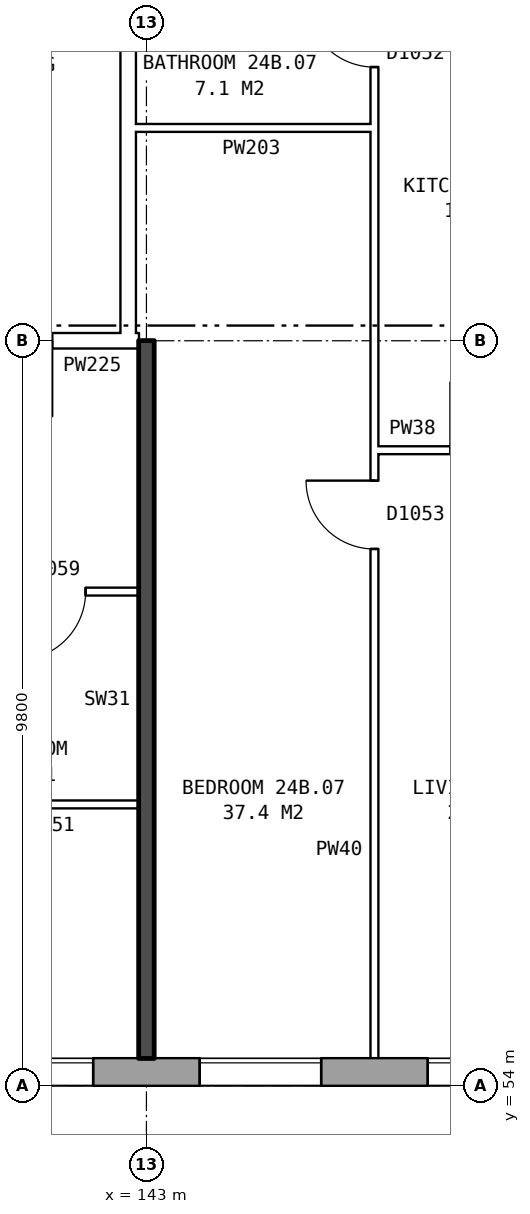
"""IFC4 building model, lengths in metres.
Left out: names, types, materials, properties, quantities, classifications, styles, units other than length and angle.
Written with IfcOpenShell. Run it as: python <this file> out.ifc"""

import sys

from ifc_helpers import new_model, si_unit, direction, frame, frame_2d, origin, place, context, subcontext, project, spatial, rectangle, extrude, element, fill, save


model = new_model("IFC4")
c1 = context("Model", 3, precision=1e-05, world=origin(), true_north=direction((0.0, 1.0)))
c2 = subcontext(c1, "Body", "Model", "MODEL_VIEW")
j1 = project(units=[si_unit("LENGTHUNIT", "METRE"), si_unit("PLANEANGLEUNIT", "RADIAN")], contexts=[c1])
p1 = place(None, origin())
s1 = spatial("IfcSite", under=j1, at=p1, CompositionType="ELEMENT")
p2 = place(p1, origin())
s2 = spatial("IfcBuilding", under=s1, at=p2, CompositionType="ELEMENT")
p3 = place(p2, frame((0.0, 0.0, 87.1)))
s3 = spatial("IfcBuildingStorey", under=s2, at=p3, CompositionType="ELEMENT", Elevation=87.1)
p4 = place(p3, frame((134.075, 54.18, 0.0), z_axis=(0.0, 0.0, 1.0), x_axis=(1.0, 0.0, 0.0)))
e1 = element("IfcWall", 1, at=p4, inside=s3, PredefinedType="STANDARD", context=c2, shape_type="SweptSolid", body=[
    extrude(rectangle(XDim=38.101, YDim=0.36, at=frame_2d((19.05, 0.0))), origin(), (0.0, 0.0, 1.0), 2.85),
])
p5 = place(p4, frame((0.625, 0.0, 0.8)))
e2 = element("IfcOpeningElement", 2, at=p5, cuts=e1, PredefinedType="OPENING", context=c2, shape_type="SweptSolid", body=[
    extrude(rectangle(XDim=1.6, YDim=1.8, at=frame_2d((0.8, 0.9))), frame((0.0, 0.19, 0.0), z_axis=(0.0, -1.0, 0.0), x_axis=(1.0, 0.0, 0.0)), (0.0, 0.0, 1.0), 0.38),
])
p6 = place(p4, frame((3.625, 0.0, 0.8)))
e3 = element("IfcOpeningElement", 3, at=p6, cuts=e1, PredefinedType="OPENING", context=c2, shape_type="SweptSolid", body=[
    extrude(rectangle(XDim=1.6, YDim=1.8, at=frame_2d((0.8, 0.9))), frame((0.0, 0.19, 0.0), z_axis=(0.0, -1.0, 0.0), x_axis=(1.0, 0.0, 0.0)), (0.0, 0.0, 1.0), 0.38),
])
p7 = place(p4, frame((6.625, 0.0, 0.8)))
e4 = element("IfcOpeningElement", 4, at=p7, cuts=e1, PredefinedType="OPENING", context=c2, shape_type="SweptSolid", body=[
    extrude(rectangle(XDim=1.6, YDim=1.8, at=frame_2d((0.8, 0.9))), frame((0.0, 0.19, 0.0), z_axis=(0.0, -1.0, 0.0), x_axis=(1.0, 0.0, 0.0)), (0.0, 0.0, 1.0), 0.38),
])
p8 = place(p4, frame((9.625, 0.0, 0.8)))
e5 = element("IfcOpeningElement", 5, at=p8, cuts=e1, PredefinedType="OPENING", context=c2, shape_type="SweptSolid", body=[
    extrude(rectangle(XDim=1.6, YDim=1.8, at=frame_2d((0.8, 0.9))), frame((0.0, 0.19, 0.0), z_axis=(0.0, -1.0, 0.0), x_axis=(1.0, 0.0, 0.0)), (0.0, 0.0, 1.0), 0.38),
])
p9 = place(p4, frame((12.625, 0.0, 0.8)))
e6 = element("IfcOpeningElement", 6, at=p9, cuts=e1, PredefinedType="OPENING", context=c2, shape_type="SweptSolid", body=[
    extrude(rectangle(XDim=1.6, YDim=1.8, at=frame_2d((0.8, 0.9))), frame((0.0, 0.19, 0.0), z_axis=(0.0, -1.0, 0.0), x_axis=(1.0, 0.0, 0.0)), (0.0, 0.0, 1.0), 0.38),
])
p10 = place(p4, frame((15.125, 0.0, 0.8)))
e7 = element("IfcOpeningElement", 7, at=p10, cuts=e1, PredefinedType="OPENING", context=c2, shape_type="SweptSolid", body=[
    extrude(rectangle(XDim=1.4, YDim=1.8, at=frame_2d((0.7, 0.9))), frame((0.0, 0.19, 0.0), z_axis=(0.0, -1.0, 0.0), x_axis=(1.0, 0.0, 0.0)), (0.0, 0.0, 1.0), 0.38),
])
p11 = place(p4, frame((18.325, 0.0, 0.15)))
e8 = element("IfcOpeningElement", 8, at=p11, cuts=e1, PredefinedType="OPENING", context=c2, shape_type="SweptSolid", body=[
    extrude(rectangle(XDim=1.4, YDim=1.2, at=frame_2d((0.7, 0.6))), frame((0.0, 0.19, 0.0), z_axis=(0.0, -1.0, 0.0), x_axis=(1.0, 0.0, 0.0)), (0.0, 0.0, 1.0), 0.38),
])
p12 = place(p4, frame((21.625, 0.0, 0.8)))
e9 = element("IfcOpeningElement", 9, at=p12, cuts=e1, PredefinedType="OPENING", context=c2, shape_type="SweptSolid", body=[
    extrude(rectangle(XDim=1.6, YDim=1.8, at=frame_2d((0.8, 0.9))), frame((0.0, 0.19, 0.0), z_axis=(0.0, -1.0, 0.0), x_axis=(1.0, 0.0, 0.0)), (0.0, 0.0, 1.0), 0.38),
])
p13 = place(p4, frame((24.625, 0.0, 0.8)))
e10 = element("IfcOpeningElement", 10, at=p13, cuts=e1, PredefinedType="OPENING", context=c2, shape_type="SweptSolid", body=[
    extrude(rectangle(XDim=1.6, YDim=1.8, at=frame_2d((0.8, 0.9))), frame((0.0, 0.19, 0.0), z_axis=(0.0, -1.0, 0.0), x_axis=(1.0, 0.0, 0.0)), (0.0, 0.0, 1.0), 0.38),
])
p14 = place(p4, frame((27.625, 0.0, 0.8)))
e11 = element("IfcOpeningElement", 11, at=p14, cuts=e1, PredefinedType="OPENING", context=c2, shape_type="SweptSolid", body=[
    extrude(rectangle(XDim=1.6, YDim=1.8, at=frame_2d((0.8, 0.9))), frame((0.0, 0.19, 0.0), z_axis=(0.0, -1.0, 0.0), x_axis=(1.0, 0.0, 0.0)), (0.0, 0.0, 1.0), 0.38),
])
p15 = place(p4, frame((30.625, 0.0, 0.8)))
e12 = element("IfcOpeningElement", 12, at=p15, cuts=e1, PredefinedType="OPENING", context=c2, shape_type="SweptSolid", body=[
    extrude(rectangle(XDim=1.6, YDim=1.8, at=frame_2d((0.8, 0.9))), frame((0.0, 0.19, 0.0), z_axis=(0.0, -1.0, 0.0), x_axis=(1.0, 0.0, 0.0)), (0.0, 0.0, 1.0), 0.38),
])
p16 = place(p4, frame((33.625, 0.0, 0.8)))
e13 = element("IfcOpeningElement", 13, at=p16, cuts=e1, PredefinedType="OPENING", context=c2, shape_type="SweptSolid", body=[
    extrude(rectangle(XDim=1.6, YDim=1.8, at=frame_2d((0.8, 0.9))), frame((0.0, 0.19, 0.0), z_axis=(0.0, -1.0, 0.0), x_axis=(1.0, 0.0, 0.0)), (0.0, 0.0, 1.0), 0.38),
])
p17 = place(p4, frame((16.825, 0.0, 1.7)))
e14 = element("IfcOpeningElement", 14, at=p17, cuts=e1, PredefinedType="OPENING", context=c2, shape_type="SweptSolid", body=[
    extrude(rectangle(XDim=0.6, YDim=0.9, at=frame_2d((0.3, 0.45))), frame((0.0, 0.19, 0.0), z_axis=(0.0, -1.0, 0.0), x_axis=(1.0, 0.0, 0.0)), (0.0, 0.0, 1.0), 0.38),
])
p18 = place(p3, frame((142.76, 63.9, 0.0), z_axis=(0.0, 0.0, 1.0), x_axis=(0.0, 1.0, 0.0)))
e15 = element("IfcWall", 15, at=p18, inside=s3, PredefinedType="PARTITIONING", context=c2, shape_type="SweptSolid", body=[
    extrude(rectangle(XDim=12.2, YDim=0.2, at=frame_2d((6.1, 0.0))), origin(), (0.0, 0.0, 1.0), 2.85),
])
p19 = place(p18, frame((5.1, 0.0, 0.0)))
e16 = element("IfcOpeningElement", 16, at=p19, cuts=e15, PredefinedType="OPENING", context=c2, shape_type="SweptSolid", body=[
    extrude(rectangle(XDim=2.0, YDim=2.1, at=frame_2d((1.0, 1.05))), frame((0.0, 0.11, 0.0), z_axis=(0.0, -1.0, 0.0), x_axis=(1.0, 0.0, 0.0)), (0.0, 0.0, 1.0), 0.22),
])
p20 = place(p3, frame((140.6, 57.7, 0.0), z_axis=(0.0, 0.0, 1.0), x_axis=(1.0, 0.0, 0.0)))
e17 = element("IfcWall", 17, at=p20, inside=s3, PredefinedType="PARTITIONING", context=c2, shape_type="SweptSolid", body=[
    extrude(rectangle(XDim=2.3, YDim=0.1, at=frame_2d((1.15, 0.0))), origin(), (0.0, 0.0, 1.0), 2.85),
])
p21 = place(p3, frame((137.1, 60.5, 0.0), z_axis=(0.0, 0.0, 1.0), x_axis=(1.0, 0.0, 0.0)))
e18 = element("IfcWall", 18, at=p21, inside=s3, PredefinedType="PARTITIONING", context=c2, shape_type="SweptSolid", body=[
    extrude(rectangle(XDim=5.8, YDim=0.1, at=frame_2d((2.9, 0.0))), origin(), (0.0, 0.0, 1.0), 2.85),
])
p22 = place(p21, frame((1.3, 0.0, 0.0)))
e19 = element("IfcOpeningElement", 19, at=p22, cuts=e18, PredefinedType="OPENING", context=c2, shape_type="SweptSolid", body=[
    extrude(rectangle(XDim=0.9, YDim=2.1, at=frame_2d((0.45, 1.05))), frame((0.0, 0.06, 0.0), z_axis=(0.0, -1.0, 0.0), x_axis=(1.0, 0.0, 0.0)), (0.0, 0.0, 1.0), 0.12),
])
p23 = place(p21, frame((4.2, 0.0, 0.0)))
e20 = element("IfcOpeningElement", 20, at=p23, cuts=e18, PredefinedType="OPENING", context=c2, shape_type="SweptSolid", body=[
    extrude(rectangle(XDim=0.9, YDim=2.1, at=frame_2d((0.45, 1.05))), frame((0.0, 0.06, 0.0), z_axis=(0.0, -1.0, 0.0), x_axis=(1.0, 0.0, 0.0)), (0.0, 0.0, 1.0), 0.12),
])
p24 = place(p3, frame((146.0, 62.36, 0.0), z_axis=(0.0, 0.0, 1.0), x_axis=(1.0, 0.0, 0.0)))
e21 = element("IfcWall", 21, at=p24, inside=s3, PredefinedType="PARTITIONING", context=c2, shape_type="SweptSolid", body=[
    extrude(rectangle(XDim=2.9, YDim=0.1, at=frame_2d((1.45, 0.0))), origin(), (0.0, 0.0, 1.0), 2.85),
])
p25 = place(p24, frame((1.0, 0.0, 0.0)))
e22 = element("IfcOpeningElement", 22, at=p25, cuts=e21, PredefinedType="OPENING", context=c2, shape_type="SweptSolid", body=[
    extrude(rectangle(XDim=0.9, YDim=2.1, at=frame_2d((0.45, 1.05))), frame((0.0, 0.06, 0.0), z_axis=(0.0, -1.0, 0.0), x_axis=(1.0, 0.0, 0.0)), (0.0, 0.0, 1.0), 0.12),
])
p26 = place(p3, frame((139.76, 63.8, 0.0), z_axis=(0.0, 0.0, 1.0), x_axis=(1.0, 0.0, 0.0)))
e23 = element("IfcWall", 23, at=p26, inside=s3, PredefinedType="PARTITIONING", context=c2, shape_type="SweptSolid", body=[
    extrude(rectangle(XDim=3.0, YDim=0.2, at=frame_2d((1.5, 0.0))), origin(), (0.0, 0.0, 1.0), 2.85),
])
p27 = place(p26, frame((1.0, 0.0, 0.0)))
e24 = element("IfcOpeningElement", 24, at=p27, cuts=e23, PredefinedType="OPENING", context=c2, shape_type="SweptSolid", body=[
    extrude(rectangle(XDim=1.0, YDim=2.1, at=frame_2d((0.5, 1.05))), frame((0.0, 0.11, 0.0), z_axis=(0.0, -1.0, 0.0), x_axis=(1.0, 0.0, 0.0)), (0.0, 0.0, 1.0), 0.22),
])
p28 = place(p3, frame((142.76, 63.8, 0.0), z_axis=(0.0, 0.0, 1.0), x_axis=(1.0, 0.0, 0.0)))
e25 = element("IfcWall", 25, at=p28, inside=s3, PredefinedType="PARTITIONING", context=c2, shape_type="SweptSolid", body=[
    extrude(rectangle(XDim=0.14, YDim=0.2, at=frame_2d((0.07, 0.0))), origin(), (0.0, 0.0, 1.0), 2.85),
])
p29 = place(p3, frame((142.76, 66.6, 0.0), z_axis=(0.0, 0.0, 1.0), x_axis=(1.0, 0.0, 0.0)))
e26 = element("IfcWall", 26, at=p29, inside=s3, PredefinedType="PARTITIONING", context=c2, shape_type="SweptSolid", body=[
    extrude(rectangle(XDim=3.24, YDim=0.1, at=frame_2d((1.62, 0.0))), origin(), (0.0, 0.0, 1.0), 2.85),
])
p30 = place(p3, frame((143.0, 54.36, 0.0), z_axis=(0.0, 0.0, 1.0), x_axis=(0.0, 1.0, 0.0)))
e27 = element("IfcWall", 27, at=p30, inside=s3, PredefinedType="SOLIDWALL", context=c2, shape_type="SweptSolid", body=[
    extrude(rectangle(XDim=9.44, YDim=0.2, at=frame_2d((4.72, 0.0))), origin(), (0.0, 0.0, 1.0), 2.85),
])
p31 = place(p3, frame((146.0, 54.36, 0.0), z_axis=(0.0, 0.0, 1.0), x_axis=(0.0, 1.0, 0.0)))
e28 = element("IfcWall", 28, at=p31, inside=s3, PredefinedType="PARTITIONING", context=c2, shape_type="SweptSolid", body=[
    extrude(rectangle(XDim=14.34, YDim=0.1, at=frame_2d((7.17, 0.0))), origin(), (0.0, 0.0, 1.0), 2.85),
])
p32 = place(p31, frame((6.7, 0.0, 0.0)))
e29 = element("IfcOpeningElement", 29, at=p32, cuts=e28, PredefinedType="OPENING", context=c2, shape_type="SweptSolid", body=[
    extrude(rectangle(XDim=0.9, YDim=2.1, at=frame_2d((0.45, 1.05))), frame((0.0, 0.06, 0.0), z_axis=(0.0, -1.0, 0.0), x_axis=(1.0, 0.0, 0.0)), (0.0, 0.0, 1.0), 0.12),
])
p33 = place(p31, frame((13.04, 0.0, 0.0)))
e30 = element("IfcOpeningElement", 30, at=p33, cuts=e28, PredefinedType="OPENING", context=c2, shape_type="SweptSolid", body=[
    extrude(rectangle(XDim=0.9, YDim=2.1, at=frame_2d((0.45, 1.05))), frame((0.0, 0.06, 0.0), z_axis=(0.0, -1.0, 0.0), x_axis=(1.0, 0.0, 0.0)), (0.0, 0.0, 1.0), 0.12),
])
p34 = place(p7, origin())
e31 = element("IfcWindow", 31, at=p34, inside=s3, PartitioningType="SINGLE_PANEL", PredefinedType="WINDOW", context=c2, shape_type="SweptSolid", body=[
    extrude(rectangle(XDim=1.6, YDim=1.8, at=frame_2d((0.8, 0.9))), frame((0.0, 0.15, 0.0), z_axis=(0.0, -1.0, 0.0), x_axis=(1.0, 0.0, 0.0)), (0.0, 0.0, 1.0), 0.06),
])
fill(e4, e31)
p35 = place(p8, origin())
e32 = element("IfcWindow", 32, at=p35, inside=s3, PartitioningType="SINGLE_PANEL", PredefinedType="WINDOW", context=c2, shape_type="SweptSolid", body=[
    extrude(rectangle(XDim=1.6, YDim=1.8, at=frame_2d((0.8, 0.9))), frame((0.0, 0.15, 0.0), z_axis=(0.0, -1.0, 0.0), x_axis=(1.0, 0.0, 0.0)), (0.0, 0.0, 1.0), 0.06),
])
fill(e5, e32)
p36 = place(p9, origin())
e33 = element("IfcWindow", 33, at=p36, inside=s3, PartitioningType="SINGLE_PANEL", PredefinedType="WINDOW", context=c2, shape_type="SweptSolid", body=[
    extrude(rectangle(XDim=1.6, YDim=1.8, at=frame_2d((0.8, 0.9))), frame((0.0, 0.15, 0.0), z_axis=(0.0, -1.0, 0.0), x_axis=(1.0, 0.0, 0.0)), (0.0, 0.0, 1.0), 0.06),
])
fill(e6, e33)
p37 = place(p23, frame((0.9, 0.0, 0.0), z_axis=(0.0, 0.0, 1.0), x_axis=(-1.0, 0.0, 0.0)))
e34 = element("IfcDoor", 34, at=p37, inside=s3, OperationType="SINGLE_SWING_RIGHT", PredefinedType="DOOR", context=c2, shape_type="SweptSolid", body=[
    extrude(rectangle(XDim=0.9, YDim=2.1, at=frame_2d((0.45, 1.05))), frame((0.0, 0.025, 0.0), z_axis=(0.0, -1.0, 0.0), x_axis=(1.0, 0.0, 0.0)), (0.0, 0.0, 1.0), 0.05),
])
fill(e20, e34)
p38 = place(p32, origin())
e35 = element("IfcDoor", 35, at=p38, inside=s3, OperationType="SINGLE_SWING_RIGHT", PredefinedType="DOOR", context=c2, shape_type="SweptSolid", body=[
    extrude(rectangle(XDim=0.9, YDim=2.1, at=frame_2d((0.45, 1.05))), frame((0.0, 0.025, 0.0), z_axis=(0.0, -1.0, 0.0), x_axis=(1.0, 0.0, 0.0)), (0.0, 0.0, 1.0), 0.05),
])
fill(e29, e35)
p39 = place(p33, origin())
e36 = element("IfcDoor", 36, at=p39, inside=s3, OperationType="SINGLE_SWING_RIGHT", PredefinedType="DOOR", context=c2, shape_type="SweptSolid", body=[
    extrude(rectangle(XDim=0.9, YDim=2.1, at=frame_2d((0.45, 1.05))), frame((0.0, 0.025, 0.0), z_axis=(0.0, -1.0, 0.0), x_axis=(1.0, 0.0, 0.0)), (0.0, 0.0, 1.0), 0.05),
])
fill(e30, e36)
save(model, sys.argv[1])
